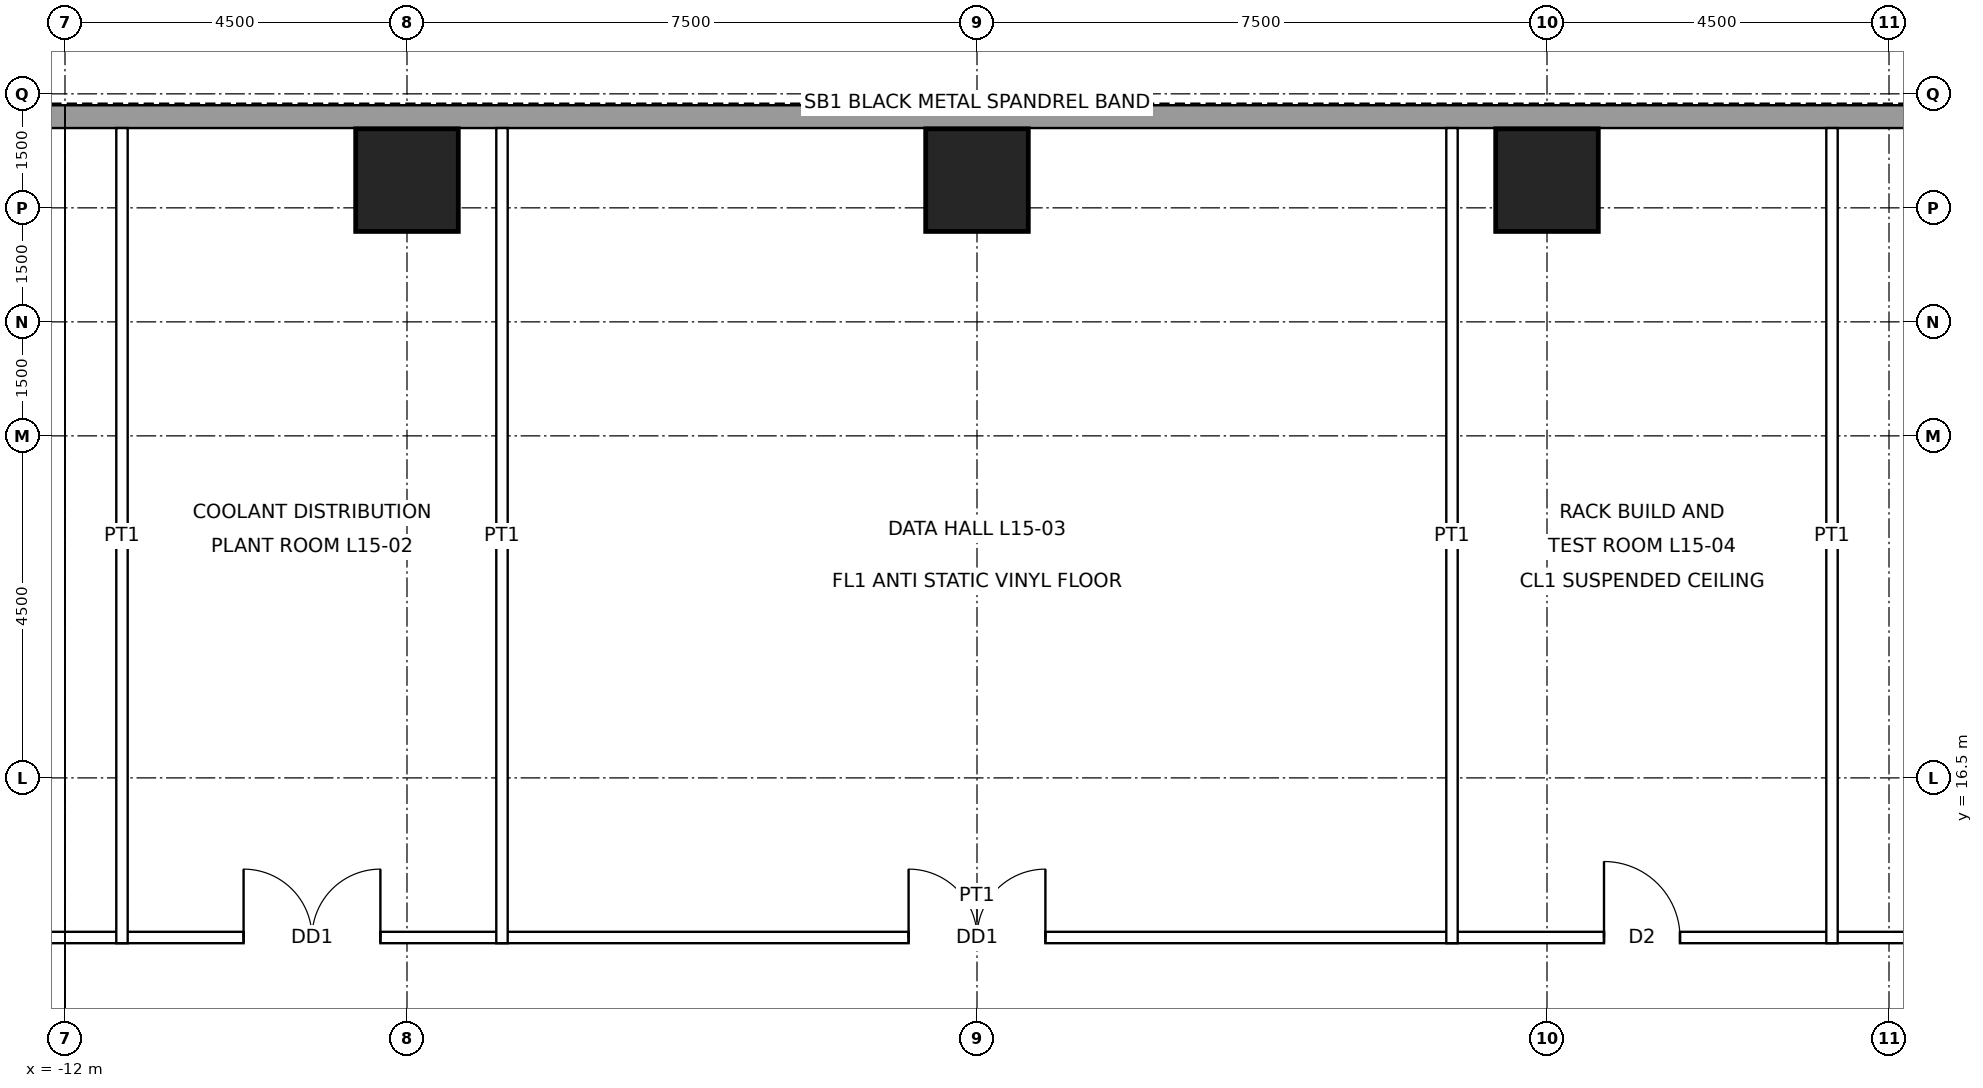
"""IFC4 building model, lengths in metres.
Left out: names, types, materials, properties, quantities, classifications, styles, units other than length and angle.
Written with IfcOpenShell. Run it as: python <this file> out.ifc"""

import sys

from ifc_helpers import new_model, si_unit, direction, frame, frame_2d, origin, origin_2d, place, context, subcontext, project, spatial, rectangle, hollow_rectangle, extrude, element, fill, save


model = new_model("IFC4")
c1 = context("Model", 3, precision=1e-05, world=origin(), true_north=direction((0.0, 1.0)))
c2 = subcontext(c1, "Body", "Model", "MODEL_VIEW")
j1 = project(units=[si_unit("LENGTHUNIT", "METRE"), si_unit("PLANEANGLEUNIT", "RADIAN")], contexts=[c1])
p1 = place(None, origin())
s1 = spatial("IfcSite", under=j1, at=p1, CompositionType="ELEMENT")
p2 = place(p1, origin())
s2 = spatial("IfcBuilding", under=s1, at=p2, CompositionType="ELEMENT")
p3 = place(p2, frame((0.0, 0.0, 78.4)))
s3 = spatial("IfcBuildingStorey", under=s2, at=p3, CompositionType="ELEMENT", Elevation=78.4)
for number, where, z_axis, x_axis in (
    (1, (-7.5, 24.365, 0.0), (0.0, 0.0, 1.0), (1.0, 0.0, 0.0)),
    (2, (0.0, 24.365, 0.0), (0.0, 0.0, 1.0), (1.0, 0.0, 0.0)),
    (3, (7.5, 24.365, 0.0), (0.0, 0.0, 1.0), (1.0, 0.0, 0.0)),
):
    element("IfcColumn", number, at=place(p3, frame(where, z_axis=z_axis, x_axis=x_axis)), inside=s3, PredefinedType="COLUMN", context=c2, shape_type="SweptSolid", body=[
        extrude(hollow_rectangle(XDim=1.35, YDim=1.35, WallThickness=0.085, at=origin_2d()), origin(), (0.0, 0.0, 1.0), 5.0),
    ])
p4 = place(p3, frame((-17.7, 25.2, 0.0), z_axis=(0.0, 0.0, 1.0), x_axis=(1.0, 0.0, 0.0)))
e4 = element("IfcWall", 4, at=p4, inside=s3, PredefinedType="SOLIDWALL", context=c2, shape_type="SweptSolid", body=[
    extrude(rectangle(XDim=35.4, YDim=0.3, at=frame_2d((17.7, 0.0))), origin(), (0.0, 0.0, 1.0), 4.8),
])
p5 = place(p3, frame((-14.475, 14.4, 0.0), z_axis=(0.0, 0.0, 1.0), x_axis=(1.0, 0.0, 0.0)))
e5 = element("IfcWall", 5, at=p5, inside=s3, PredefinedType="PARTITIONING", context=c2, shape_type="SweptSolid", body=[
    extrude(rectangle(XDim=28.95, YDim=0.15, at=frame_2d((14.475, 0.0))), origin(), (0.0, 0.0, 1.0), 4.8),
])
p6 = place(p5, frame((4.825, 0.0, 0.0)))
e6 = element("IfcOpeningElement", 6, at=p6, cuts=e5, PredefinedType="OPENING", context=c2, shape_type="SweptSolid", body=[
    extrude(rectangle(XDim=1.8, YDim=2.4, at=frame_2d((0.9, 1.2))), frame((0.0, 0.085, 0.0), z_axis=(0.0, -1.0, 0.0), x_axis=(1.0, 0.0, 0.0)), (0.0, 0.0, 1.0), 0.17),
])
p7 = place(p5, frame((13.575, 0.0, 0.0)))
e7 = element("IfcOpeningElement", 7, at=p7, cuts=e5, PredefinedType="OPENING", context=c2, shape_type="SweptSolid", body=[
    extrude(rectangle(XDim=1.8, YDim=2.4, at=frame_2d((0.9, 1.2))), frame((0.0, 0.085, 0.0), z_axis=(0.0, -1.0, 0.0), x_axis=(1.0, 0.0, 0.0)), (0.0, 0.0, 1.0), 0.17),
])
p8 = place(p5, frame((22.725, 0.0, 0.0)))
e8 = element("IfcOpeningElement", 8, at=p8, cuts=e5, PredefinedType="OPENING", context=c2, shape_type="SweptSolid", body=[
    extrude(rectangle(XDim=1.0, YDim=2.1, at=frame_2d((0.5, 1.05))), frame((0.0, 0.085, 0.0), z_axis=(0.0, -1.0, 0.0), x_axis=(1.0, 0.0, 0.0)), (0.0, 0.0, 1.0), 0.17),
])
p9 = place(p5, frame((26.8, 0.0, 0.0)))
e9 = element("IfcOpeningElement", 9, at=p9, cuts=e5, PredefinedType="OPENING", context=c2, shape_type="SweptSolid", body=[
    extrude(rectangle(XDim=1.0, YDim=2.1, at=frame_2d((0.5, 1.05))), frame((0.0, 0.085, 0.0), z_axis=(0.0, -1.0, 0.0), x_axis=(1.0, 0.0, 0.0)), (0.0, 0.0, 1.0), 0.17),
])
p10 = place(p5, frame((1.15, 0.0, 0.0)))
e10 = element("IfcOpeningElement", 10, at=p10, cuts=e5, PredefinedType="OPENING", context=c2, shape_type="SweptSolid", body=[
    extrude(rectangle(XDim=1.0, YDim=2.1, at=frame_2d((0.5, 1.05))), frame((0.0, 0.085, 0.0), z_axis=(0.0, -1.0, 0.0), x_axis=(1.0, 0.0, 0.0)), (0.0, 0.0, 1.0), 0.17),
])
p11 = place(p3, frame((-11.25, 14.325, 0.0), z_axis=(0.0, 0.0, 1.0), x_axis=(0.0, 1.0, 0.0)))
e11 = element("IfcWall", 11, at=p11, inside=s3, PredefinedType="PARTITIONING", context=c2, shape_type="SweptSolid", body=[
    extrude(rectangle(XDim=10.725, YDim=0.15, at=frame_2d((5.363, 0.0))), origin(), (0.0, 0.0, 1.0), 3.853),
])
for number, where, z_axis, x_axis in (
    (12, (-6.25, 14.325, 0.0), (0.0, 0.0, 1.0), (0.0, 1.0, 0.0)),
    (13, (6.25, 14.325, 0.0), (0.0, 0.0, 1.0), (0.0, 1.0, 0.0)),
):
    element("IfcWall", number, at=place(p3, frame(where, z_axis=z_axis, x_axis=x_axis)), inside=s3, PredefinedType="PARTITIONING", context=c2, shape_type="SweptSolid", body=[
        extrude(rectangle(XDim=10.725, YDim=0.15, at=frame_2d((5.363, 0.0))), origin(), (0.0, 0.0, 1.0), 4.8),
    ])
p12 = place(p3, frame((11.25, 14.325, 0.0), z_axis=(0.0, 0.0, 1.0), x_axis=(0.0, 1.0, 0.0)))
e14 = element("IfcWall", 14, at=p12, inside=s3, PredefinedType="PARTITIONING", context=c2, shape_type="SweptSolid", body=[
    extrude(rectangle(XDim=10.725, YDim=0.15, at=frame_2d((5.363, 0.0))), origin(), (0.0, 0.0, 1.0), 3.853),
])
p13 = place(p6, origin())
e15 = element("IfcDoor", 15, at=p13, inside=s3, OperationType="DOUBLE_DOOR_SINGLE_SWING", PredefinedType="DOOR", context=c2, shape_type="SweptSolid", body=[
    extrude(rectangle(XDim=1.8, YDim=2.4, at=frame_2d((0.9, 1.2))), frame((0.0, 0.025, 0.0), z_axis=(0.0, -1.0, 0.0), x_axis=(1.0, 0.0, 0.0)), (0.0, 0.0, 1.0), 0.05),
])
fill(e6, e15)
p14 = place(p7, origin())
e16 = element("IfcDoor", 16, at=p14, inside=s3, OperationType="DOUBLE_DOOR_SINGLE_SWING", PredefinedType="DOOR", context=c2, shape_type="SweptSolid", body=[
    extrude(rectangle(XDim=1.8, YDim=2.4, at=frame_2d((0.9, 1.2))), frame((0.0, 0.025, 0.0), z_axis=(0.0, -1.0, 0.0), x_axis=(1.0, 0.0, 0.0)), (0.0, 0.0, 1.0), 0.05),
])
fill(e7, e16)
p15 = place(p8, origin())
e17 = element("IfcDoor", 17, at=p15, inside=s3, OperationType="SINGLE_SWING_LEFT", PredefinedType="DOOR", context=c2, shape_type="SweptSolid", body=[
    extrude(rectangle(XDim=1.0, YDim=2.1, at=frame_2d((0.5, 1.05))), frame((0.0, 0.025, 0.0), z_axis=(0.0, -1.0, 0.0), x_axis=(1.0, 0.0, 0.0)), (0.0, 0.0, 1.0), 0.05),
])
fill(e8, e17)
save(model, sys.argv[1])
